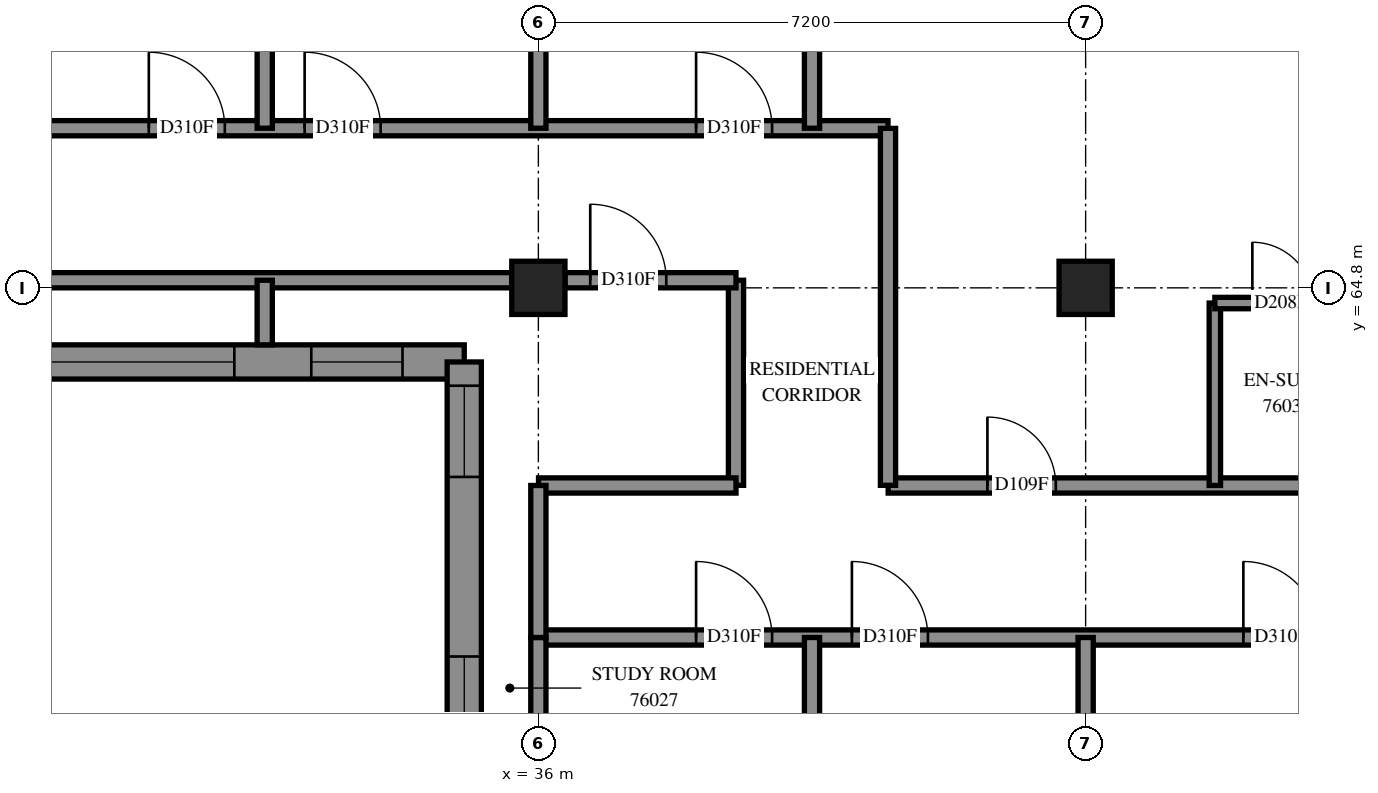
"""IFC4 building model, lengths in metres.
Left out: names, types, materials, properties, quantities, classifications, styles, units other than length and angle.
Written with IfcOpenShell. Run it as: python <this file> out.ifc"""

import sys

from ifc_helpers import new_model, si_unit, direction, frame, frame_2d, origin, origin_2d, place, context, subcontext, project, spatial, polyline, rectangle, outline, extrude, element, fill, save


model = new_model("IFC4")
c1 = context("Model", 3, precision=1e-05, world=origin(), true_north=direction((0.0, 1.0)))
c2 = subcontext(c1, "Body", "Model", "MODEL_VIEW")
j1 = project(units=[si_unit("LENGTHUNIT", "METRE"), si_unit("PLANEANGLEUNIT", "RADIAN")], contexts=[c1])
p1 = place(None, origin())
s1 = spatial("IfcSite", under=j1, at=p1, CompositionType="ELEMENT")
p2 = place(p1, origin())
s2 = spatial("IfcBuilding", under=s1, at=p2, CompositionType="ELEMENT")
p3 = place(p2, frame((0.0, 0.0, 277.8)))
s3 = spatial("IfcBuildingStorey", under=s2, at=p3, CompositionType="ELEMENT", Elevation=277.8)
for number, where, z_axis, x_axis in (
    (1, (36.0, 64.8, 0.0), (0.0, 0.0, 1.0), (1.0, 0.0, 0.0)),
    (2, (43.2, 64.8, 0.0), (0.0, 0.0, 1.0), (1.0, 0.0, 0.0)),
):
    element("IfcColumn", number, at=place(p3, frame(where, z_axis=z_axis, x_axis=x_axis)), inside=s3, PredefinedType="COLUMN", context=c2, shape_type="SweptSolid", body=[
        extrude(rectangle(XDim=0.7, YDim=0.7, at=origin_2d()), origin(), (0.0, 0.0, 1.0), 3.1),
    ])
p4 = place(p3, frame((26.622, 63.825, 0.0), z_axis=(0.0, 0.0, 1.0), x_axis=(1.0, 0.0, 0.0)))
e3 = element("IfcWall", 3, at=p4, inside=s3, PredefinedType="SOLIDWALL", context=c2, shape_type="SweptSolid", body=[
    extrude(outline(polyline([(-0.225, -0.225), (8.178, -0.225), (8.628, 0.225), (0.225, 0.225), (-0.225, -0.225)])), origin(), (0.0, 0.0, 1.0), 3.1),
])
p5 = place(p4, frame((2.578, 0.0, 0.45)))
e4 = element("IfcOpeningElement", 4, at=p5, cuts=e3, PredefinedType="OPENING", context=c2, shape_type="SweptSolid", body=[
    extrude(rectangle(XDim=2.8, YDim=2.55, at=frame_2d((1.4, 1.275))), frame((0.0, 0.235, 0.0), z_axis=(0.0, -1.0, 0.0), x_axis=(1.0, 0.0, 0.0)), (0.0, 0.0, 1.0), 0.47),
])
p6 = place(p4, frame((0.702, 0.0, 0.45)))
e5 = element("IfcOpeningElement", 5, at=p6, cuts=e3, PredefinedType="OPENING", context=c2, shape_type="SweptSolid", body=[
    extrude(rectangle(XDim=1.2, YDim=2.55, at=frame_2d((0.6, 1.275))), frame((0.0, 0.235, 0.0), z_axis=(0.0, -1.0, 0.0), x_axis=(1.0, 0.0, 0.0)), (0.0, 0.0, 1.0), 0.47),
])
p7 = place(p4, frame((6.391, 0.0, 0.45)))
e6 = element("IfcOpeningElement", 6, at=p7, cuts=e3, PredefinedType="OPENING", context=c2, shape_type="SweptSolid", body=[
    extrude(rectangle(XDim=1.2, YDim=2.55, at=frame_2d((0.6, 1.275))), frame((0.0, 0.235, 0.0), z_axis=(0.0, -1.0, 0.0), x_axis=(1.0, 0.0, 0.0)), (0.0, 0.0, 1.0), 0.47),
])
p8 = place(p3, frame((35.025, 63.825, 0.0), z_axis=(0.0, 0.0, 1.0), x_axis=(0.0, -1.0, 0.0)))
e7 = element("IfcWall", 7, at=p8, inside=s3, PredefinedType="SOLIDWALL", context=c2, shape_type="SweptSolid", body=[
    extrude(outline(polyline([(0.225, -0.225), (7.425, -0.225), (6.975, 0.225), (-0.225, 0.225), (0.225, -0.225)])), origin(), (0.0, 0.0, 1.0), 3.1),
])
p9 = place(p8, frame((0.312, 0.0, 0.45)))
e8 = element("IfcOpeningElement", 8, at=p9, cuts=e7, PredefinedType="OPENING", context=c2, shape_type="SweptSolid", body=[
    extrude(rectangle(XDim=1.2, YDim=2.55, at=frame_2d((0.6, 1.275))), frame((0.0, 0.235, 0.0), z_axis=(0.0, -1.0, 0.0), x_axis=(1.0, 0.0, 0.0)), (0.0, 0.0, 1.0), 0.47),
])
p10 = place(p8, frame((3.875, 0.0, 0.7)))
e9 = element("IfcOpeningElement", 9, at=p10, cuts=e7, PredefinedType="OPENING", context=c2, shape_type="SweptSolid", body=[
    extrude(rectangle(XDim=1.8, YDim=2.3, at=frame_2d((0.9, 1.15))), frame((0.0, 0.235, 0.0), z_axis=(0.0, -1.0, 0.0), x_axis=(1.0, 0.0, 0.0)), (0.0, 0.0, 1.0), 0.47),
])
p11 = place(p3, frame((36.0, 60.2, 0.0), z_axis=(0.0, 0.0, 1.0), x_axis=(1.0, 0.0, 0.0)))
e10 = element("IfcWall", 10, at=p11, inside=s3, PredefinedType="PARTITIONING", context=c2, shape_type="SweptSolid", body=[
    extrude(rectangle(XDim=17.0, YDim=0.2, at=frame_2d((8.5, 0.0))), origin(), (0.0, 0.0, 1.0), 3.1),
])
p12 = place(p11, frame((15.802, 0.0, 0.0)))
e11 = element("IfcOpeningElement", 11, at=p12, cuts=e10, PredefinedType="OPENING", context=c2, shape_type="SweptSolid", body=[
    extrude(rectangle(XDim=1.0, YDim=2.1, at=frame_2d((0.5, 1.05))), frame((0.0, 0.11, 0.0), z_axis=(0.0, -1.0, 0.0), x_axis=(1.0, 0.0, 0.0)), (0.0, 0.0, 1.0), 0.22),
])
p13 = place(p11, frame((2.075, 0.0, 0.0)))
e12 = element("IfcOpeningElement", 12, at=p13, cuts=e10, PredefinedType="OPENING", context=c2, shape_type="SweptSolid", body=[
    extrude(rectangle(XDim=1.0, YDim=2.1, at=frame_2d((0.5, 1.05))), frame((0.0, 0.11, 0.0), z_axis=(0.0, -1.0, 0.0), x_axis=(1.0, 0.0, 0.0)), (0.0, 0.0, 1.0), 0.22),
])
p14 = place(p11, frame((4.125, 0.0, 0.0)))
e13 = element("IfcOpeningElement", 13, at=p14, cuts=e10, PredefinedType="OPENING", context=c2, shape_type="SweptSolid", body=[
    extrude(rectangle(XDim=1.0, YDim=2.1, at=frame_2d((0.5, 1.05))), frame((0.0, 0.11, 0.0), z_axis=(0.0, -1.0, 0.0), x_axis=(1.0, 0.0, 0.0)), (0.0, 0.0, 1.0), 0.22),
])
p15 = place(p11, frame((9.275, 0.0, 0.0)))
e14 = element("IfcOpeningElement", 14, at=p15, cuts=e10, PredefinedType="OPENING", context=c2, shape_type="SweptSolid", body=[
    extrude(rectangle(XDim=1.0, YDim=2.1, at=frame_2d((0.5, 1.05))), frame((0.0, 0.11, 0.0), z_axis=(0.0, -1.0, 0.0), x_axis=(1.0, 0.0, 0.0)), (0.0, 0.0, 1.0), 0.22),
])
p16 = place(p11, frame((11.48, 0.0, 0.0)))
e15 = element("IfcOpeningElement", 15, at=p16, cuts=e10, PredefinedType="OPENING", context=c2, shape_type="SweptSolid", body=[
    extrude(rectangle(XDim=1.0, YDim=2.1, at=frame_2d((0.5, 1.05))), frame((0.0, 0.11, 0.0), z_axis=(0.0, -1.0, 0.0), x_axis=(1.0, 0.0, 0.0)), (0.0, 0.0, 1.0), 0.22),
])
p17 = place(p3, frame((28.8, 66.9, 0.0), z_axis=(0.0, 0.0, 1.0), x_axis=(1.0, 0.0, 0.0)))
e16 = element("IfcWall", 16, at=p17, inside=s3, PredefinedType="PARTITIONING", context=c2, shape_type="SweptSolid", body=[
    extrude(rectangle(XDim=11.8, YDim=0.2, at=frame_2d((5.9, 0.0))), origin(), (0.0, 0.0, 1.0), 3.1),
])
p18 = place(p17, frame((2.075, 0.0, 0.0)))
e17 = element("IfcOpeningElement", 17, at=p18, cuts=e16, PredefinedType="OPENING", context=c2, shape_type="SweptSolid", body=[
    extrude(rectangle(XDim=1.0, YDim=2.1, at=frame_2d((0.5, 1.05))), frame((0.0, 0.11, 0.0), z_axis=(0.0, -1.0, 0.0), x_axis=(1.0, 0.0, 0.0)), (0.0, 0.0, 1.0), 0.22),
])
p19 = place(p17, frame((9.275, 0.0, 0.0)))
e18 = element("IfcOpeningElement", 18, at=p19, cuts=e16, PredefinedType="OPENING", context=c2, shape_type="SweptSolid", body=[
    extrude(rectangle(XDim=1.0, YDim=2.1, at=frame_2d((0.5, 1.05))), frame((0.0, 0.11, 0.0), z_axis=(0.0, -1.0, 0.0), x_axis=(1.0, 0.0, 0.0)), (0.0, 0.0, 1.0), 0.22),
])
p20 = place(p17, frame((4.125, 0.0, 0.0)))
e19 = element("IfcOpeningElement", 19, at=p20, cuts=e16, PredefinedType="OPENING", context=c2, shape_type="SweptSolid", body=[
    extrude(rectangle(XDim=1.0, YDim=2.1, at=frame_2d((0.5, 1.05))), frame((0.0, 0.11, 0.0), z_axis=(0.0, -1.0, 0.0), x_axis=(1.0, 0.0, 0.0)), (0.0, 0.0, 1.0), 0.22),
])
p21 = place(p3, frame((40.602, 62.2, 0.0), z_axis=(0.0, 0.0, 1.0), x_axis=(1.0, 0.0, 0.0)))
e20 = element("IfcWall", 20, at=p21, inside=s3, PredefinedType="PARTITIONING", context=c2, shape_type="SweptSolid", body=[
    extrude(rectangle(XDim=9.798, YDim=0.2, at=frame_2d((4.899, 0.0))), origin(), (0.0, 0.0, 1.0), 3.1),
])
p22 = place(p21, frame((1.306, 0.0, 0.0)))
e21 = element("IfcOpeningElement", 21, at=p22, cuts=e20, PredefinedType="OPENING", context=c2, shape_type="SweptSolid", body=[
    extrude(rectangle(XDim=0.9, YDim=2.1, at=frame_2d((0.45, 1.05))), frame((0.0, 0.11, 0.0), z_axis=(0.0, -1.0, 0.0), x_axis=(1.0, 0.0, 0.0)), (0.0, 0.0, 1.0), 0.22),
])
p23 = place(p21, frame((6.711, 0.0, 0.0)))
e22 = element("IfcOpeningElement", 22, at=p23, cuts=e20, PredefinedType="OPENING", context=c2, shape_type="SweptSolid", body=[
    extrude(rectangle(XDim=1.0, YDim=2.1, at=frame_2d((0.5, 1.05))), frame((0.0, 0.11, 0.0), z_axis=(0.0, -1.0, 0.0), x_axis=(1.0, 0.0, 0.0)), (0.0, 0.0, 1.0), 0.22),
])
p24 = place(p3, frame((29.15, 64.9, 0.0), z_axis=(0.0, 0.0, 1.0), x_axis=(1.0, 0.0, 0.0)))
e23 = element("IfcWall", 23, at=p24, inside=s3, PredefinedType="PARTITIONING", context=c2, shape_type="SweptSolid", body=[
    extrude(rectangle(XDim=6.5, YDim=0.2, at=frame_2d((3.25, 0.0))), origin(), (0.0, 0.0, 1.0), 2.6),
])
p25 = place(p3, frame((32.4, 66.9, 0.0), z_axis=(0.0, 0.0, 1.0), x_axis=(0.0, 1.0, 0.0)))
e24 = element("IfcWall", 24, at=p25, inside=s3, PredefinedType="PARTITIONING", context=c2, shape_type="SweptSolid", body=[
    extrude(rectangle(XDim=6.184, YDim=0.2, at=frame_2d((3.092, 0.0))), origin(), (0.0, 0.0, 1.0), 3.1),
])
p26 = place(p3, frame((39.6, 66.9, 0.0), z_axis=(0.0, 0.0, 1.0), x_axis=(0.0, 1.0, 0.0)))
e25 = element("IfcWall", 25, at=p26, inside=s3, PredefinedType="PARTITIONING", context=c2, shape_type="SweptSolid", body=[
    extrude(rectangle(XDim=5.85, YDim=0.2, at=frame_2d((2.925, 0.0))), origin(), (0.0, 0.0, 1.0), 3.1),
])
p27 = place(p3, frame((36.0, 66.9, 0.0), z_axis=(0.0, 0.0, 1.0), x_axis=(0.0, 1.0, 0.0)))
e26 = element("IfcWall", 26, at=p27, inside=s3, PredefinedType="PARTITIONING", context=c2, shape_type="SweptSolid", body=[
    extrude(rectangle(XDim=4.75, YDim=0.2, at=frame_2d((2.375, 0.0))), origin(), (0.0, 0.0, 1.0), 3.1),
])
p28 = place(p3, frame((40.6, 62.202, 0.0), z_axis=(0.0, 0.0, 1.0), x_axis=(0.0, 1.0, 0.0)))
e27 = element("IfcWall", 27, at=p28, inside=s3, PredefinedType="PARTITIONING", context=c2, shape_type="SweptSolid", body=[
    extrude(rectangle(XDim=4.696, YDim=0.2, at=frame_2d((2.348, 0.0))), origin(), (0.0, 0.0, 1.0), 3.1),
])
p29 = place(p3, frame((39.6, 56.85, 0.0), z_axis=(0.0, 0.0, 1.0), x_axis=(0.0, 1.0, 0.0)))
e28 = element("IfcWall", 28, at=p29, inside=s3, PredefinedType="PARTITIONING", context=c2, shape_type="SweptSolid", body=[
    extrude(rectangle(XDim=3.35, YDim=0.2, at=frame_2d((1.675, 0.0))), origin(), (0.0, 0.0, 1.0), 3.1),
])
p30 = place(p3, frame((38.6, 62.202, 0.0), z_axis=(0.0, 0.0, 1.0), x_axis=(0.0, 1.0, 0.0)))
e29 = element("IfcWall", 29, at=p30, inside=s3, PredefinedType="PARTITIONING", context=c2, shape_type="SweptSolid", body=[
    extrude(rectangle(XDim=2.698, YDim=0.2, at=frame_2d((1.349, 0.0))), origin(), (0.0, 0.0, 1.0), 3.1),
])
p31 = place(p3, frame((36.002, 62.2, 0.0), z_axis=(0.0, 0.0, 1.0), x_axis=(1.0, 0.0, 0.0)))
e30 = element("IfcWall", 30, at=p31, inside=s3, PredefinedType="PARTITIONING", context=c2, shape_type="SweptSolid", body=[
    extrude(rectangle(XDim=2.598, YDim=0.2, at=frame_2d((1.299, 0.0))), origin(), (0.0, 0.0, 1.0), 3.1),
])
p32 = place(p3, frame((44.9, 62.2, 0.0), z_axis=(0.0, 0.0, 1.0), x_axis=(0.0, 1.0, 0.0)))
e31 = element("IfcWall", 31, at=p32, inside=s3, PredefinedType="PARTITIONING", context=c2, shape_type="SweptSolid", body=[
    extrude(rectangle(XDim=2.4, YDim=0.15, at=frame_2d((1.2, 0.0))), origin(), (0.0, 0.0, 1.0), 3.1),
])
p33 = place(p3, frame((36.35, 64.9, 0.0), z_axis=(0.0, 0.0, 1.0), x_axis=(1.0, 0.0, 0.0)))
e32 = element("IfcWall", 32, at=p33, inside=s3, PredefinedType="PARTITIONING", context=c2, shape_type="SweptSolid", body=[
    extrude(rectangle(XDim=2.25, YDim=0.2, at=frame_2d((1.125, 0.0))), origin(), (0.0, 0.0, 1.0), 3.1),
])
p34 = place(p33, frame((0.333, 0.0, 0.0)))
e33 = element("IfcOpeningElement", 33, at=p34, cuts=e32, PredefinedType="OPENING", context=c2, shape_type="SweptSolid", body=[
    extrude(rectangle(XDim=1.0, YDim=2.1, at=frame_2d((0.5, 1.05))), frame((0.0, 0.11, 0.0), z_axis=(0.0, -1.0, 0.0), x_axis=(1.0, 0.0, 0.0)), (0.0, 0.0, 1.0), 0.22),
])
p35 = place(p3, frame((36.0, 57.95, 0.0), z_axis=(0.0, 0.0, 1.0), x_axis=(0.0, 1.0, 0.0)))
e34 = element("IfcWall", 34, at=p35, inside=s3, PredefinedType="PARTITIONING", context=c2, shape_type="SweptSolid", body=[
    extrude(rectangle(XDim=2.25, YDim=0.2, at=frame_2d((1.125, 0.0))), origin(), (0.0, 0.0, 1.0), 2.6),
])
p36 = place(p3, frame((43.2, 57.95, 0.0), z_axis=(0.0, 0.0, 1.0), x_axis=(0.0, 1.0, 0.0)))
e35 = element("IfcWall", 35, at=p36, inside=s3, PredefinedType="PARTITIONING", context=c2, shape_type="SweptSolid", body=[
    extrude(rectangle(XDim=2.25, YDim=0.2, at=frame_2d((1.125, 0.0))), origin(), (0.0, 0.0, 1.0), 3.1),
])
p37 = place(p3, frame((36.0, 60.2, 0.0), z_axis=(0.0, 0.0, 1.0), x_axis=(0.0, 1.0, 0.0)))
e36 = element("IfcWall", 36, at=p37, inside=s3, PredefinedType="PARTITIONING", context=c2, shape_type="SweptSolid", body=[
    extrude(rectangle(XDim=2.0, YDim=0.2, at=frame_2d((1.0, 0.0))), origin(), (0.0, 0.0, 1.0), 2.6),
])
p38 = place(p3, frame((44.9, 64.6, 0.0), z_axis=(0.0, 0.0, 1.0), x_axis=(1.0, 0.0, 0.0)))
e37 = element("IfcWall", 37, at=p38, inside=s3, PredefinedType="PARTITIONING", context=c2, shape_type="SweptSolid", body=[
    extrude(rectangle(XDim=1.9, YDim=0.15, at=frame_2d((0.95, 0.0))), origin(), (0.0, 0.0, 1.0), 3.1),
])
p39 = place(p38, frame((0.493, 0.0, 0.0)))
e38 = element("IfcOpeningElement", 38, at=p39, cuts=e37, PredefinedType="OPENING", context=c2, shape_type="SweptSolid", body=[
    extrude(rectangle(XDim=0.8, YDim=2.1, at=frame_2d((0.4, 1.05))), frame((0.0, 0.085, 0.0), z_axis=(0.0, -1.0, 0.0), x_axis=(1.0, 0.0, 0.0)), (0.0, 0.0, 1.0), 0.17),
])
p40 = place(p3, frame((32.4, 64.05, 0.0), z_axis=(0.0, 0.0, 1.0), x_axis=(0.0, 1.0, 0.0)))
e39 = element("IfcWall", 39, at=p40, inside=s3, PredefinedType="PARTITIONING", context=c2, shape_type="SweptSolid", body=[
    extrude(rectangle(XDim=0.85, YDim=0.2, at=frame_2d((0.425, 0.0))), origin(), (0.0, 0.0, 1.0), 3.1),
])
p41 = place(p5, origin())
e40 = element("IfcWindow", 40, at=p41, inside=s3, PartitioningType="SINGLE_PANEL", PredefinedType="WINDOW", context=c2, shape_type="SweptSolid", body=[
    extrude(rectangle(XDim=2.8, YDim=2.55, at=frame_2d((1.4, 1.275))), frame((0.0, 0.205, 0.0), z_axis=(0.0, -1.0, 0.0), x_axis=(1.0, 0.0, 0.0)), (0.0, 0.0, 1.0), 0.06),
])
fill(e4, e40)
p42 = place(p7, origin())
e41 = element("IfcWindow", 41, at=p42, inside=s3, PartitioningType="SINGLE_PANEL", PredefinedType="WINDOW", context=c2, shape_type="SweptSolid", body=[
    extrude(rectangle(XDim=1.2, YDim=2.55, at=frame_2d((0.6, 1.275))), frame((0.0, 0.205, 0.0), z_axis=(0.0, -1.0, 0.0), x_axis=(1.0, 0.0, 0.0)), (0.0, 0.0, 1.0), 0.06),
])
fill(e6, e41)
p43 = place(p9, origin())
e42 = element("IfcWindow", 42, at=p43, inside=s3, PartitioningType="SINGLE_PANEL", PredefinedType="WINDOW", context=c2, shape_type="SweptSolid", body=[
    extrude(rectangle(XDim=1.2, YDim=2.55, at=frame_2d((0.6, 1.275))), frame((0.0, 0.205, 0.0), z_axis=(0.0, -1.0, 0.0), x_axis=(1.0, 0.0, 0.0)), (0.0, 0.0, 1.0), 0.06),
])
fill(e8, e42)
p44 = place(p18, origin())
e43 = element("IfcDoor", 43, at=p44, inside=s3, OperationType="SINGLE_SWING_RIGHT", PredefinedType="DOOR", context=c2, shape_type="SweptSolid", body=[
    extrude(rectangle(XDim=1.0, YDim=2.1, at=frame_2d((0.5, 1.05))), frame((0.0, 0.025, 0.0), z_axis=(0.0, -1.0, 0.0), x_axis=(1.0, 0.0, 0.0)), (0.0, 0.0, 1.0), 0.05),
])
fill(e17, e43)
p45 = place(p19, origin())
e44 = element("IfcDoor", 44, at=p45, inside=s3, OperationType="SINGLE_SWING_RIGHT", PredefinedType="DOOR", context=c2, shape_type="SweptSolid", body=[
    extrude(rectangle(XDim=1.0, YDim=2.1, at=frame_2d((0.5, 1.05))), frame((0.0, 0.025, 0.0), z_axis=(0.0, -1.0, 0.0), x_axis=(1.0, 0.0, 0.0)), (0.0, 0.0, 1.0), 0.05),
])
fill(e18, e44)
p46 = place(p34, origin())
e45 = element("IfcDoor", 45, at=p46, inside=s3, OperationType="SINGLE_SWING_RIGHT", PredefinedType="DOOR", context=c2, shape_type="SweptSolid", body=[
    extrude(rectangle(XDim=1.0, YDim=2.1, at=frame_2d((0.5, 1.05))), frame((0.0, 0.025, 0.0), z_axis=(0.0, -1.0, 0.0), x_axis=(1.0, 0.0, 0.0)), (0.0, 0.0, 1.0), 0.05),
])
fill(e33, e45)
p47 = place(p20, origin())
e46 = element("IfcDoor", 46, at=p47, inside=s3, OperationType="SINGLE_SWING_LEFT", PredefinedType="DOOR", context=c2, shape_type="SweptSolid", body=[
    extrude(rectangle(XDim=1.0, YDim=2.1, at=frame_2d((0.5, 1.05))), frame((0.0, 0.025, 0.0), z_axis=(0.0, -1.0, 0.0), x_axis=(1.0, 0.0, 0.0)), (0.0, 0.0, 1.0), 0.05),
])
fill(e19, e46)
p48 = place(p13, origin())
e47 = element("IfcDoor", 47, at=p48, inside=s3, OperationType="SINGLE_SWING_LEFT", PredefinedType="DOOR", context=c2, shape_type="SweptSolid", body=[
    extrude(rectangle(XDim=1.0, YDim=2.1, at=frame_2d((0.5, 1.05))), frame((0.0, 0.025, 0.0), z_axis=(0.0, -1.0, 0.0), x_axis=(1.0, 0.0, 0.0)), (0.0, 0.0, 1.0), 0.05),
])
fill(e12, e47)
p49 = place(p14, origin())
e48 = element("IfcDoor", 48, at=p49, inside=s3, OperationType="SINGLE_SWING_RIGHT", PredefinedType="DOOR", context=c2, shape_type="SweptSolid", body=[
    extrude(rectangle(XDim=1.0, YDim=2.1, at=frame_2d((0.5, 1.05))), frame((0.0, 0.025, 0.0), z_axis=(0.0, -1.0, 0.0), x_axis=(1.0, 0.0, 0.0)), (0.0, 0.0, 1.0), 0.05),
])
fill(e13, e48)
p50 = place(p15, origin())
e49 = element("IfcDoor", 49, at=p50, inside=s3, OperationType="SINGLE_SWING_LEFT", PredefinedType="DOOR", context=c2, shape_type="SweptSolid", body=[
    extrude(rectangle(XDim=1.0, YDim=2.1, at=frame_2d((0.5, 1.05))), frame((0.0, 0.025, 0.0), z_axis=(0.0, -1.0, 0.0), x_axis=(1.0, 0.0, 0.0)), (0.0, 0.0, 1.0), 0.05),
])
fill(e14, e49)
p51 = place(p22, origin())
e50 = element("IfcDoor", 50, at=p51, inside=s3, OperationType="SINGLE_SWING_LEFT", PredefinedType="DOOR", context=c2, shape_type="SweptSolid", body=[
    extrude(rectangle(XDim=0.9, YDim=2.1, at=frame_2d((0.45, 1.05))), frame((0.0, 0.025, 0.0), z_axis=(0.0, -1.0, 0.0), x_axis=(1.0, 0.0, 0.0)), (0.0, 0.0, 1.0), 0.05),
])
fill(e21, e50)
p52 = place(p39, origin())
e51 = element("IfcDoor", 51, at=p52, inside=s3, OperationType="SINGLE_SWING_RIGHT", PredefinedType="DOOR", context=c2, shape_type="SweptSolid", body=[
    extrude(rectangle(XDim=0.8, YDim=2.1, at=frame_2d((0.4, 1.05))), frame((0.0, 0.025, 0.0), z_axis=(0.0, -1.0, 0.0), x_axis=(1.0, 0.0, 0.0)), (0.0, 0.0, 1.0), 0.05),
])
fill(e38, e51)
p53 = place(p10, origin())
e52 = element("IfcWindow", 52, at=p53, inside=s3, PartitioningType="SINGLE_PANEL", PredefinedType="WINDOW", context=c2, shape_type="SweptSolid", body=[
    extrude(rectangle(XDim=1.8, YDim=2.3, at=frame_2d((0.9, 1.15))), frame((0.0, 0.205, 0.0), z_axis=(0.0, -1.0, 0.0), x_axis=(1.0, 0.0, 0.0)), (0.0, 0.0, 1.0), 0.06),
])
fill(e9, e52)
save(model, sys.argv[1])
